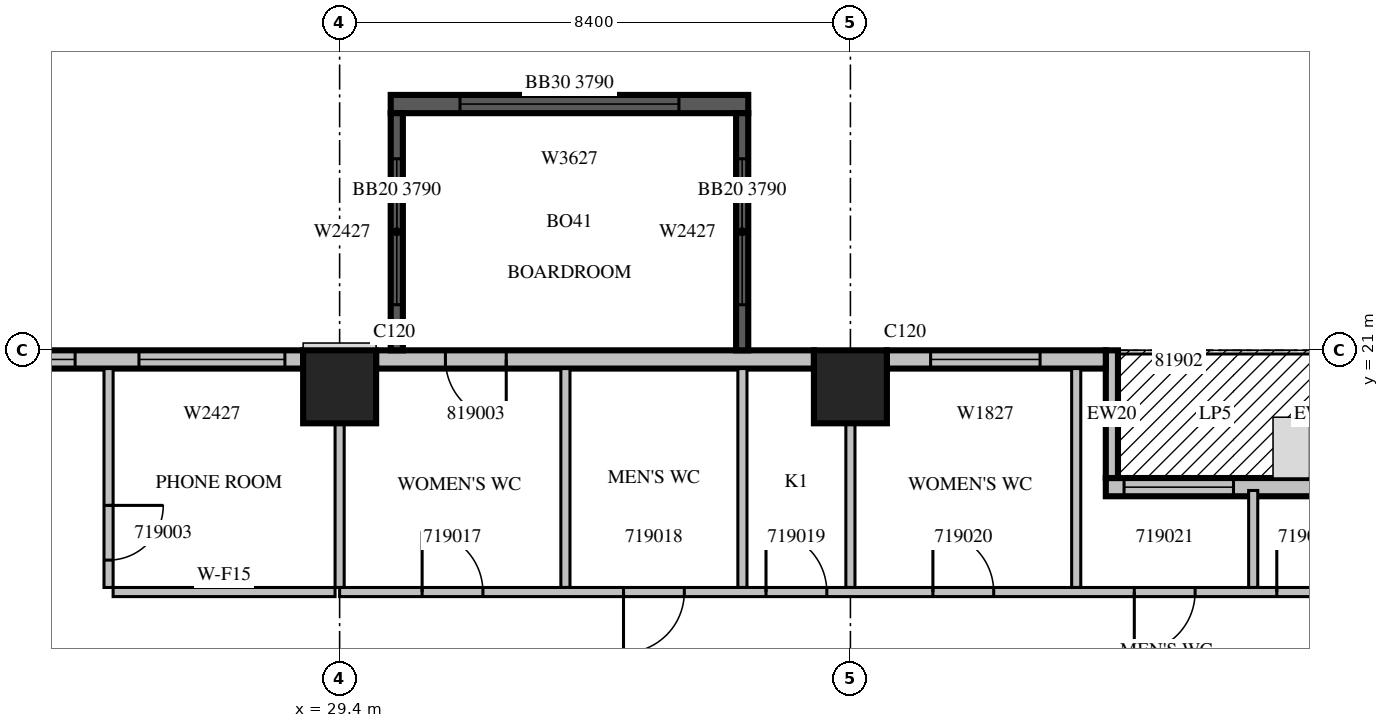
"""IFC4 building model, lengths in metres.
Left out: names, types, materials, properties, quantities, classifications, styles, units other than length and angle.
Written with IfcOpenShell. Run it as: python <this file> out.ifc"""

import sys

from ifc_helpers import new_model, si_unit, direction, frame, frame_2d, origin, origin_2d, place, context, subcontext, project, spatial, rectangle, extrude, source, transform, mapped, element, fill, save


model = new_model("IFC4")
c1 = context("Model", 3, precision=1e-05, world=origin(), true_north=direction((0.0, 1.0)))
c2 = subcontext(c1, "Body", "Model", "MODEL_VIEW")
j1 = project(units=[si_unit("LENGTHUNIT", "METRE"), si_unit("PLANEANGLEUNIT", "RADIAN")], contexts=[c1])
p1 = place(None, origin())
s1 = spatial("IfcSite", under=j1, at=p1, CompositionType="ELEMENT")
p2 = place(p1, origin())
s2 = spatial("IfcBuilding", under=s1, at=p2, CompositionType="ELEMENT")
p3 = place(p2, frame((0.0, 0.0, 90.9)))
s3 = spatial("IfcBuildingStorey", under=s2, at=p3, CompositionType="ELEMENT", Elevation=90.9)
m1 = source(origin(), c2, "Body", "SweptSolid", [
    extrude(rectangle(XDim=1.2, YDim=1.2, at=origin_2d()), origin(), (0.0, 0.0, 1.0), 4.2),
])
for number, where, z_axis, x_axis in (
    (1, (29.4, 20.4, 0.0), (0.0, 0.0, 1.0), (1.0, 0.0, 0.0)),
    (2, (37.8, 20.4, 0.0), (0.0, 0.0, 1.0), (1.0, 0.0, 0.0)),
):
    element("IfcColumn", number, at=place(p3, frame(where, z_axis=z_axis, x_axis=x_axis)), inside=s3, PredefinedType="COLUMN", context=c2, shape_type="MappedRepresentation", body=[
        mapped(m1, transform((0.0, 0.0, 0.0), scale=1.0)),
    ])
m2 = source(origin(), c2, "Body", "SweptSolid", [
    extrude(rectangle(XDim=3.6, YDim=0.3, at=frame_2d((1.8, 0.0))), origin(), (0.0, 0.0, 1.0), 3.8),
])
p4 = place(p3, frame((45.6, 18.75, 0.0), z_axis=(0.0, 0.0, 1.0), x_axis=(-1.0, 0.0, 0.0)))
e3 = element("IfcWall", 3, at=p4, inside=s3, PredefinedType="STANDARD", context=c2, shape_type="MappedRepresentation", body=[
    mapped(m2, transform((0.0, 0.0, 0.0), scale=1.0)),
])
m3 = source(origin(), c2, "Body", "SweptSolid", [
    extrude(rectangle(XDim=1.8, YDim=2.4, at=frame_2d((0.9, 1.2))), frame((0.0, 0.16, 0.0), z_axis=(0.0, -1.0, 0.0), x_axis=(1.0, 0.0, 0.0)), (0.0, 0.0, 1.0), 0.32),
])
p5 = place(p4, frame((1.5, 0.0, 0.0)))
e4 = element("IfcOpeningElement", 4, at=p5, cuts=e3, PredefinedType="OPENING", context=c2, shape_type="MappedRepresentation", body=[
    mapped(m3, transform((0.0, 0.0, 0.0), scale=1.0)),
])
m4 = source(origin(), c2, "Body", "SweptSolid", [
    extrude(rectangle(XDim=2.1, YDim=0.2, at=frame_2d((1.05, 0.0))), origin(), (0.0, 0.0, 1.0), 3.8),
])
p6 = place(p3, frame((42.1, 21.0, 0.0), z_axis=(0.0, 0.0, 1.0), x_axis=(0.0, -1.0, 0.0)))
e5 = element("IfcWall", 5, at=p6, inside=s3, PredefinedType="STANDARD", context=c2, shape_type="MappedRepresentation", body=[
    mapped(m4, transform((0.0, 0.0, 0.0), scale=1.0)),
])
p7 = place(p3, frame((42.0, 20.85, 0.0), z_axis=(0.0, 0.0, 1.0), x_axis=(-1.0, 0.0, 0.0)))
e6 = element("IfcWall", 6, at=p7, inside=s3, PredefinedType="STANDARD", context=c2, shape_type="MappedRepresentation", body=[
    mapped(m2, transform((0.0, 0.0, 0.0), scale=1.0)),
])
m5 = source(origin(), c2, "Body", "SweptSolid", [
    extrude(rectangle(XDim=1.8, YDim=2.7, at=frame_2d((0.9, 1.35))), frame((0.0, 0.16, 0.0), z_axis=(0.0, -1.0, 0.0), x_axis=(1.0, 0.0, 0.0)), (0.0, 0.0, 1.0), 0.32),
])
p8 = place(p7, frame((1.081, 0.0, 0.6)))
e7 = element("IfcOpeningElement", 7, at=p8, cuts=e6, PredefinedType="OPENING", context=c2, shape_type="MappedRepresentation", body=[
    mapped(m5, transform((0.0, 0.0, 0.0), scale=1.0)),
])
m6 = source(origin(), c2, "Body", "SweptSolid", [
    extrude(rectangle(XDim=7.2, YDim=0.3, at=frame_2d((3.6, 0.0))), origin(), (0.0, 0.0, 1.0), 3.8),
])
p9 = place(p3, frame((37.2, 20.85, 0.0), z_axis=(0.0, 0.0, 1.0), x_axis=(-1.0, 0.0, 0.0)))
e8 = element("IfcWall", 8, at=p9, inside=s3, PredefinedType="STANDARD", context=c2, shape_type="MappedRepresentation", body=[
    mapped(m6, transform((0.0, 0.0, 0.0), scale=1.0)),
])
m7 = source(origin(), c2, "Body", "SweptSolid", [
    extrude(rectangle(XDim=1.0, YDim=2.1, at=frame_2d((0.5, 1.05))), frame((0.0, 0.16, 0.0), z_axis=(0.0, -1.0, 0.0), x_axis=(1.0, 0.0, 0.0)), (0.0, 0.0, 1.0), 0.32),
])
p10 = place(p9, frame((5.06, 0.0, 0.0)))
e9 = element("IfcOpeningElement", 9, at=p10, cuts=e8, PredefinedType="OPENING", context=c2, shape_type="MappedRepresentation", body=[
    mapped(m7, transform((0.0, 0.0, 0.0), scale=1.0)),
])
m8 = source(origin(), c2, "Body", "SweptSolid", [
    extrude(rectangle(XDim=6.6, YDim=0.3, at=frame_2d((3.3, 0.0))), origin(), (0.0, 0.0, 1.0), 3.8),
])
p11 = place(p3, frame((28.8, 20.85, 0.0), z_axis=(0.0, 0.0, 1.0), x_axis=(-1.0, 0.0, 0.0)))
e10 = element("IfcWall", 10, at=p11, inside=s3, PredefinedType="STANDARD", context=c2, shape_type="MappedRepresentation", body=[
    mapped(m8, transform((0.0, 0.0, 0.0), scale=1.0)),
])
m9 = source(origin(), c2, "Body", "SweptSolid", [
    extrude(rectangle(XDim=2.4, YDim=2.7, at=frame_2d((1.2, 1.35))), frame((0.0, 0.16, 0.0), z_axis=(0.0, -1.0, 0.0), x_axis=(1.0, 0.0, 0.0)), (0.0, 0.0, 1.0), 0.32),
])
p12 = place(p11, frame((0.3, 0.0, 0.6)))
e11 = element("IfcOpeningElement", 11, at=p12, cuts=e10, PredefinedType="OPENING", context=c2, shape_type="MappedRepresentation", body=[
    mapped(m9, transform((0.0, 0.0, 0.0), scale=1.0)),
])
p13 = place(p11, frame((3.75, 0.0, 0.6)))
e12 = element("IfcOpeningElement", 12, at=p13, cuts=e10, PredefinedType="OPENING", context=c2, shape_type="MappedRepresentation", body=[
    mapped(m5, transform((0.0, 0.0, 0.0), scale=1.0)),
])
m10 = source(origin(), c2, "Body", "SweptSolid", [
    extrude(rectangle(XDim=5.88, YDim=0.3, at=frame_2d((2.94, 0.0))), origin(), (0.0, 0.0, 1.0), 3.79),
])
p14 = place(p3, frame((36.12, 25.05, 0.0), z_axis=(0.0, 0.0, 1.0), x_axis=(-1.0, 0.0, 0.0)))
e13 = element("IfcWall", 13, at=p14, inside=s3, PredefinedType="SOLIDWALL", context=c2, shape_type="MappedRepresentation", body=[
    mapped(m10, transform((0.0, 0.0, 0.0), scale=1.0)),
])
m11 = source(origin(), c2, "Body", "SweptSolid", [
    extrude(rectangle(XDim=3.6, YDim=2.7, at=frame_2d((1.8, 1.35))), frame((0.0, 0.16, 0.0), z_axis=(0.0, -1.0, 0.0), x_axis=(1.0, 0.0, 0.0)), (0.0, 0.0, 1.0), 0.32),
])
p15 = place(p14, frame((1.14, 0.0, 0.6)))
e14 = element("IfcOpeningElement", 14, at=p15, cuts=e13, PredefinedType="OPENING", context=c2, shape_type="MappedRepresentation", body=[
    mapped(m11, transform((0.0, 0.0, 0.0), scale=1.0)),
])
m12 = source(origin(), c2, "Body", "SweptSolid", [
    extrude(rectangle(XDim=3.9, YDim=0.2, at=frame_2d((1.95, 0.0))), origin(), (0.0, 0.0, 1.0), 3.79),
])
p16 = place(p3, frame((36.02, 21.0, 0.0), z_axis=(0.0, 0.0, 1.0), x_axis=(0.0, 1.0, 0.0)))
e15 = element("IfcWall", 15, at=p16, inside=s3, PredefinedType="SOLIDWALL", context=c2, shape_type="MappedRepresentation", body=[
    mapped(m12, transform((0.0, 0.0, 0.0), scale=1.0)),
])
m13 = source(origin(), c2, "Body", "SweptSolid", [
    extrude(rectangle(XDim=2.4, YDim=2.7, at=frame_2d((1.2, 1.35))), frame((0.0, 0.11, 0.0), z_axis=(0.0, -1.0, 0.0), x_axis=(1.0, 0.0, 0.0)), (0.0, 0.0, 1.0), 0.22),
])
p17 = place(p16, frame((0.75, 0.0, 0.6)))
e16 = element("IfcOpeningElement", 16, at=p17, cuts=e15, PredefinedType="OPENING", context=c2, shape_type="MappedRepresentation", body=[
    mapped(m13, transform((0.0, 0.0, 0.0), scale=1.0)),
])
p18 = place(p3, frame((30.34, 21.0, 0.0), z_axis=(0.0, 0.0, 1.0), x_axis=(0.0, 1.0, 0.0)))
e17 = element("IfcWall", 17, at=p18, inside=s3, PredefinedType="SOLIDWALL", context=c2, shape_type="MappedRepresentation", body=[
    mapped(m12, transform((0.0, 0.0, 0.0), scale=1.0)),
])
p19 = place(p18, frame((0.75, 0.0, 0.6)))
e18 = element("IfcOpeningElement", 18, at=p19, cuts=e17, PredefinedType="OPENING", context=c2, shape_type="MappedRepresentation", body=[
    mapped(m13, transform((0.0, 0.0, 0.0), scale=1.0)),
])
m14 = source(origin(), c2, "Body", "SweptSolid", [
    extrude(rectangle(XDim=3.6, YDim=0.15, at=frame_2d((1.8, 0.0))), origin(), (0.0, 0.0, 1.0), 3.8),
])
p20 = place(p3, frame((25.6, 20.7, 0.0), z_axis=(0.0, 0.0, 1.0), x_axis=(0.0, -1.0, 0.0)))
e19 = element("IfcWall", 19, at=p20, inside=s3, PredefinedType="PARTITIONING", context=c2, shape_type="MappedRepresentation", body=[
    mapped(m14, transform((0.0, 0.0, 0.0), scale=1.0)),
])
m15 = source(origin(), c2, "Body", "SweptSolid", [
    extrude(rectangle(XDim=0.9, YDim=2.1, at=frame_2d((0.45, 1.05))), frame((0.0, 0.085, 0.0), z_axis=(0.0, -1.0, 0.0), x_axis=(1.0, 0.0, 0.0)), (0.0, 0.0, 1.0), 0.17),
])
p21 = place(p20, frame((2.25, 0.0, 0.0)))
e20 = element("IfcOpeningElement", 20, at=p21, cuts=e19, PredefinedType="OPENING", context=c2, shape_type="MappedRepresentation", body=[
    mapped(m15, transform((0.0, 0.0, 0.0), scale=1.0)),
])
m16 = source(origin(), c2, "Body", "SweptSolid", [
    extrude(rectangle(XDim=3.65, YDim=0.15, at=frame_2d((1.825, 0.0))), origin(), (0.0, 0.0, 1.0), 3.8),
])
p22 = place(p3, frame((25.675, 17.025, 0.0), z_axis=(0.0, 0.0, 1.0), x_axis=(1.0, 0.0, 0.0)))
e21 = element("IfcWall", 21, at=p22, inside=s3, PredefinedType="PARTITIONING", context=c2, shape_type="MappedRepresentation", body=[
    mapped(m16, transform((0.0, 0.0, 0.0), scale=1.0)),
])
m17 = source(origin(), c2, "Body", "SweptSolid", [
    extrude(rectangle(XDim=2.701, YDim=0.15, at=frame_2d((1.351, 0.0))), origin(), (0.0, 0.0, 1.0), 3.8),
])
p23 = place(p3, frame((29.4, 17.1, 0.0), z_axis=(0.0, 0.0, 1.0), x_axis=(0.0, 1.0, 0.0)))
e22 = element("IfcWall", 22, at=p23, inside=s3, PredefinedType="PARTITIONING", context=c2, shape_type="MappedRepresentation", body=[
    mapped(m17, transform((0.0, 0.0, 0.0), scale=1.0)),
])
for number, where, z_axis, x_axis in (
    (23, (33.113, 20.7, 0.0), (0.0, 0.0, 1.0), (0.0, -1.0, 0.0)),
    (24, (36.024, 20.7, 0.0), (0.0, 0.0, 1.0), (0.0, -1.0, 0.0)),
    (25, (41.513, 20.7, 0.0), (0.0, 0.0, 1.0), (0.0, -1.0, 0.0)),
):
    element("IfcWall", number, at=place(p3, frame(where, z_axis=z_axis, x_axis=x_axis)), inside=s3, PredefinedType="PARTITIONING", context=c2, shape_type="MappedRepresentation", body=[
        mapped(m14, transform((0.0, 0.0, 0.0), scale=1.0)),
    ])
p24 = place(p3, frame((44.424, 18.695, 0.0), z_axis=(0.0, 0.0, 1.0), x_axis=(0.0, -1.0, 0.0)))
e26 = element("IfcWall", 26, at=p24, inside=s3, PredefinedType="PARTITIONING", context=c2, shape_type="SweptSolid", body=[
    extrude(rectangle(XDim=1.595, YDim=0.15, at=frame_2d((0.797, 0.0))), origin(), (0.0, 0.0, 1.0), 3.8),
])
p25 = place(p3, frame((37.8, 17.1, 0.0), z_axis=(0.0, 0.0, 1.0), x_axis=(0.0, 1.0, 0.0)))
e27 = element("IfcWall", 27, at=p25, inside=s3, PredefinedType="PARTITIONING", context=c2, shape_type="MappedRepresentation", body=[
    mapped(m17, transform((0.0, 0.0, 0.0), scale=1.0)),
])
m18 = source(origin(), c2, "Body", "SweptSolid", [
    extrude(rectangle(XDim=37.5, YDim=0.15, at=frame_2d((18.75, 0.0))), origin(), (0.0, 0.0, 1.0), 3.8),
])
p26 = place(p3, frame((29.4, 17.025, 0.0), z_axis=(0.0, 0.0, 1.0), x_axis=(1.0, 0.0, 0.0)))
e28 = element("IfcWall", 28, at=p26, inside=s3, PredefinedType="PARTITIONING", context=c2, shape_type="MappedRepresentation", body=[
    mapped(m18, transform((0.0, 0.0, 0.0), scale=1.0)),
])
m19 = source(origin(), c2, "Body", "SweptSolid", [
    extrude(rectangle(XDim=1.0, YDim=2.1, at=frame_2d((0.5, 1.05))), frame((0.0, 0.085, 0.0), z_axis=(0.0, -1.0, 0.0), x_axis=(1.0, 0.0, 0.0)), (0.0, 0.0, 1.0), 0.17),
])
p27 = place(p26, frame((1.357, 0.0, 0.0)))
e29 = element("IfcOpeningElement", 29, at=p27, cuts=e28, PredefinedType="OPENING", context=c2, shape_type="MappedRepresentation", body=[
    mapped(m19, transform((0.0, 0.0, 0.0), scale=1.0)),
])
p28 = place(p26, frame((4.669, 0.0, 0.0)))
e30 = element("IfcOpeningElement", 30, at=p28, cuts=e28, PredefinedType="OPENING", context=c2, shape_type="MappedRepresentation", body=[
    mapped(m19, transform((0.0, 0.0, 0.0), scale=1.0)),
])
p29 = place(p26, frame((7.012, 0.0, 0.0)))
e31 = element("IfcOpeningElement", 31, at=p29, cuts=e28, PredefinedType="OPENING", context=c2, shape_type="MappedRepresentation", body=[
    mapped(m19, transform((0.0, 0.0, 0.0), scale=1.0)),
])
p30 = place(p26, frame((9.757, 0.0, 0.0)))
e32 = element("IfcOpeningElement", 32, at=p30, cuts=e28, PredefinedType="OPENING", context=c2, shape_type="MappedRepresentation", body=[
    mapped(m19, transform((0.0, 0.0, 0.0), scale=1.0)),
])
p31 = place(p26, frame((13.069, 0.0, 0.0)))
e33 = element("IfcOpeningElement", 33, at=p31, cuts=e28, PredefinedType="OPENING", context=c2, shape_type="MappedRepresentation", body=[
    mapped(m19, transform((0.0, 0.0, 0.0), scale=1.0)),
])
p32 = place(p26, frame((15.412, 0.0, 0.0)))
e34 = element("IfcOpeningElement", 34, at=p32, cuts=e28, PredefinedType="OPENING", context=c2, shape_type="MappedRepresentation", body=[
    mapped(m19, transform((0.0, 0.0, 0.0), scale=1.0)),
])
m20 = source(origin(), c2, "Body", "SweptSolid", [
    extrude(rectangle(XDim=1.2, YDim=2.1, at=frame_2d((0.6, 1.05))), frame((0.0, 0.085, 0.0), z_axis=(0.0, -1.0, 0.0), x_axis=(1.0, 0.0, 0.0)), (0.0, 0.0, 1.0), 0.17),
])
p33 = place(p26, frame((19.14, 0.0, 0.0)))
e35 = element("IfcOpeningElement", 35, at=p33, cuts=e28, PredefinedType="OPENING", context=c2, shape_type="MappedRepresentation", body=[
    mapped(m20, transform((0.0, 0.0, 0.0), scale=1.0)),
])
p34 = place(p26, frame((25.02, 0.0, 0.0)))
e36 = element("IfcOpeningElement", 36, at=p34, cuts=e28, PredefinedType="OPENING", context=c2, shape_type="MappedRepresentation", body=[
    mapped(m20, transform((0.0, 0.0, 0.0), scale=1.0)),
])
p35 = place(p26, frame((30.364, 0.0, 0.0)))
e37 = element("IfcOpeningElement", 37, at=p35, cuts=e28, PredefinedType="OPENING", context=c2, shape_type="MappedRepresentation", body=[
    mapped(m15, transform((0.0, 0.0, 0.0), scale=1.0)),
])
p36 = place(p26, frame((34.871, 0.0, 0.0)))
e38 = element("IfcOpeningElement", 38, at=p36, cuts=e28, PredefinedType="OPENING", context=c2, shape_type="MappedRepresentation", body=[
    mapped(m15, transform((0.0, 0.0, 0.0), scale=1.0)),
])
m21 = source(origin(), c2, "Body", "SweptSolid", [
    extrude(rectangle(XDim=1.8, YDim=2.4, at=frame_2d((0.9, 1.2))), frame((0.0, 0.025, 0.0), z_axis=(0.0, -1.0, 0.0), x_axis=(1.0, 0.0, 0.0)), (0.0, 0.0, 1.0), 0.05),
])
p37 = place(p5, origin())
e39 = element("IfcDoor", 39, at=p37, inside=s3, OperationType="SLIDING_TO_LEFT", PredefinedType="DOOR", context=c2, shape_type="MappedRepresentation", body=[
    mapped(m21, transform((0.0, 0.0, 0.0), scale=1.0)),
])
fill(e4, e39)
m22 = source(origin(), c2, "Body", "SweptSolid", [
    extrude(rectangle(XDim=2.4, YDim=2.7, at=frame_2d((1.2, 1.35))), frame((0.0, 0.03, 0.0), z_axis=(0.0, -1.0, 0.0), x_axis=(1.0, 0.0, 0.0)), (0.0, 0.0, 1.0), 0.06),
])
p38 = place(p12, origin())
e40 = element("IfcWindow", 40, at=p38, inside=s3, PartitioningType="SINGLE_PANEL", PredefinedType="WINDOW", context=c2, shape_type="MappedRepresentation", body=[
    mapped(m22, transform((0.0, 0.0, 0.0), scale=1.0)),
])
fill(e11, e40)
m23 = source(origin(), c2, "Body", "SweptSolid", [
    extrude(rectangle(XDim=1.8, YDim=2.7, at=frame_2d((0.9, 1.35))), frame((0.0, 0.03, 0.0), z_axis=(0.0, -1.0, 0.0), x_axis=(1.0, 0.0, 0.0)), (0.0, 0.0, 1.0), 0.06),
])
p39 = place(p13, origin())
e41 = element("IfcWindow", 41, at=p39, inside=s3, PartitioningType="SINGLE_PANEL", PredefinedType="WINDOW", context=c2, shape_type="MappedRepresentation", body=[
    mapped(m23, transform((0.0, 0.0, 0.0), scale=1.0)),
])
fill(e12, e41)
p40 = place(p8, origin())
e42 = element("IfcWindow", 42, at=p40, inside=s3, PartitioningType="SINGLE_PANEL", PredefinedType="WINDOW", context=c2, shape_type="MappedRepresentation", body=[
    mapped(m23, transform((0.0, 0.0, 0.0), scale=1.0)),
])
fill(e7, e42)
m24 = source(origin(), c2, "Body", "SweptSolid", [
    extrude(rectangle(XDim=3.6, YDim=2.7, at=frame_2d((1.8, 1.35))), frame((0.0, 0.03, 0.0), z_axis=(0.0, -1.0, 0.0), x_axis=(1.0, 0.0, 0.0)), (0.0, 0.0, 1.0), 0.06),
])
p41 = place(p15, origin())
e43 = element("IfcWindow", 43, at=p41, inside=s3, PartitioningType="SINGLE_PANEL", PredefinedType="WINDOW", context=c2, shape_type="MappedRepresentation", body=[
    mapped(m24, transform((0.0, 0.0, 0.0), scale=1.0)),
])
fill(e14, e43)
p42 = place(p17, origin())
e44 = element("IfcWindow", 44, at=p42, inside=s3, PartitioningType="SINGLE_PANEL", PredefinedType="WINDOW", context=c2, shape_type="MappedRepresentation", body=[
    mapped(m22, transform((0.0, 0.0, 0.0), scale=1.0)),
])
fill(e16, e44)
p43 = place(p19, origin())
e45 = element("IfcWindow", 45, at=p43, inside=s3, PartitioningType="SINGLE_PANEL", PredefinedType="WINDOW", context=c2, shape_type="MappedRepresentation", body=[
    mapped(m22, transform((0.0, 0.0, 0.0), scale=1.0)),
])
fill(e18, e45)
m25 = source(origin(), c2, "Body", "SweptSolid", [
    extrude(rectangle(XDim=0.9, YDim=2.1, at=frame_2d((0.45, 1.05))), frame((0.0, 0.025, 0.0), z_axis=(0.0, -1.0, 0.0), x_axis=(1.0, 0.0, 0.0)), (0.0, 0.0, 1.0), 0.05),
])
p44 = place(p21, origin())
e46 = element("IfcDoor", 46, at=p44, inside=s3, OperationType="SINGLE_SWING_LEFT", PredefinedType="DOOR", context=c2, shape_type="MappedRepresentation", body=[
    mapped(m25, transform((0.0, 0.0, 0.0), scale=1.0)),
])
fill(e20, e46)
m26 = source(origin(), c2, "Body", "SweptSolid", [
    extrude(rectangle(XDim=1.0, YDim=2.1, at=frame_2d((0.5, 1.05))), frame((0.0, 0.025, 0.0), z_axis=(0.0, -1.0, 0.0), x_axis=(1.0, 0.0, 0.0)), (0.0, 0.0, 1.0), 0.05),
])
p45 = place(p27, origin())
e47 = element("IfcDoor", 47, at=p45, inside=s3, OperationType="SINGLE_SWING_LEFT", PredefinedType="DOOR", context=c2, shape_type="MappedRepresentation", body=[
    mapped(m26, transform((0.0, 0.0, 0.0), scale=1.0)),
])
fill(e29, e47)
p46 = place(p28, origin())
e48 = element("IfcDoor", 48, at=p46, inside=s3, OperationType="SINGLE_SWING_RIGHT", PredefinedType="DOOR", context=c2, shape_type="MappedRepresentation", body=[
    mapped(m26, transform((0.0, 0.0, 0.0), scale=1.0)),
])
fill(e30, e48)
p47 = place(p29, origin())
e49 = element("IfcDoor", 49, at=p47, inside=s3, OperationType="SINGLE_SWING_LEFT", PredefinedType="DOOR", context=c2, shape_type="MappedRepresentation", body=[
    mapped(m26, transform((0.0, 0.0, 0.0), scale=1.0)),
])
fill(e31, e49)
p48 = place(p30, origin())
e50 = element("IfcDoor", 50, at=p48, inside=s3, OperationType="SINGLE_SWING_LEFT", PredefinedType="DOOR", context=c2, shape_type="MappedRepresentation", body=[
    mapped(m26, transform((0.0, 0.0, 0.0), scale=1.0)),
])
fill(e32, e50)
p49 = place(p31, origin())
e51 = element("IfcDoor", 51, at=p49, inside=s3, OperationType="SINGLE_SWING_RIGHT", PredefinedType="DOOR", context=c2, shape_type="MappedRepresentation", body=[
    mapped(m26, transform((0.0, 0.0, 0.0), scale=1.0)),
])
fill(e33, e51)
p50 = place(p32, origin())
e52 = element("IfcDoor", 52, at=p50, inside=s3, OperationType="SINGLE_SWING_LEFT", PredefinedType="DOOR", context=c2, shape_type="MappedRepresentation", body=[
    mapped(m26, transform((0.0, 0.0, 0.0), scale=1.0)),
])
fill(e34, e52)
p51 = place(p10, origin())
e53 = element("IfcDoor", 53, at=p51, inside=s3, OperationType="SINGLE_SWING_LEFT", PredefinedType="DOOR", context=c2, shape_type="MappedRepresentation", body=[
    mapped(m26, transform((0.0, 0.0, 0.0), scale=1.0)),
])
fill(e9, e53)
save(model, sys.argv[1])
